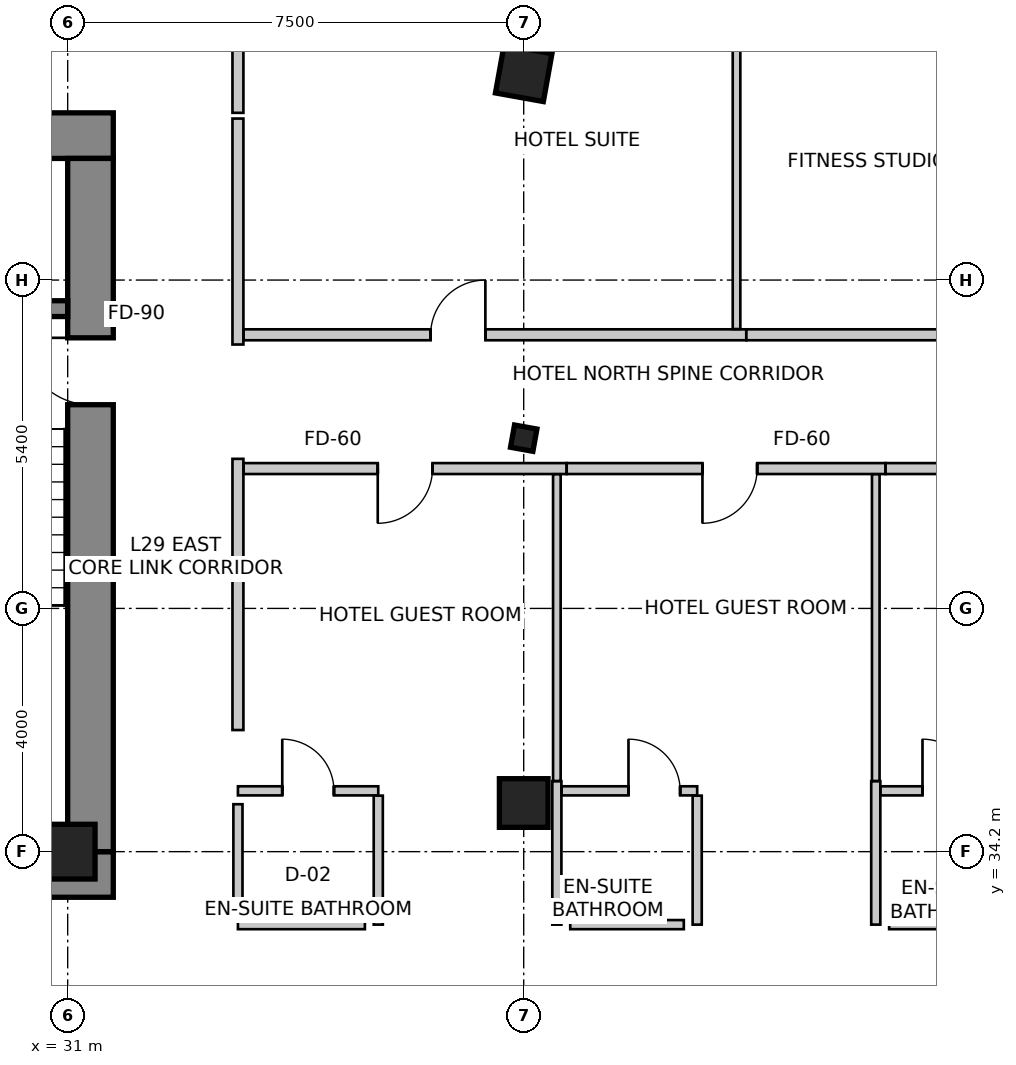
"""IFC4 building model, lengths in metres.
Left out: names, types, materials, properties, quantities, classifications, styles, units other than length and angle.
Written with IfcOpenShell. Run it as: python <this file> out.ifc"""

import sys

from ifc_helpers import new_model, si_unit, direction, frame, frame_2d, origin, origin_2d, place, context, subcontext, project, spatial, rectangle, i_section, extrude, source, transform, mapped, element, fill, save


model = new_model("IFC4")
c1 = context("Model", 3, precision=1e-05, world=origin(), true_north=direction((0.0, 1.0)))
c2 = subcontext(c1, "Body", "Model", "MODEL_VIEW")
j1 = project(units=[si_unit("LENGTHUNIT", "METRE"), si_unit("PLANEANGLEUNIT", "RADIAN")], contexts=[c1])
p1 = place(None, origin())
s1 = spatial("IfcSite", under=j1, at=p1, CompositionType="ELEMENT")
p2 = place(p1, origin())
s2 = spatial("IfcBuilding", under=s1, at=p2, CompositionType="ELEMENT")
p3 = place(p2, frame((0.0, 0.0, 121.4)))
s3 = spatial("IfcBuildingStorey", under=s2, at=p3, CompositionType="ELEMENT", Elevation=121.4)
p4 = place(p3, frame((15.85, 45.975, 0.0), z_axis=(0.0, 0.0, 1.0), x_axis=(1.0, 0.0, 0.0)))
e1 = element("IfcWall", 1, at=p4, inside=s3, PredefinedType="SHEAR", context=c2, shape_type="SweptSolid", body=[
    extrude(rectangle(XDim=15.9, YDim=0.75, at=frame_2d((7.95, 0.0))), origin(), (0.0, 0.0, 1.0), 3.6),
])
p5 = place(p3, frame((15.85, 33.825, 0.0), z_axis=(0.0, 0.0, 1.0), x_axis=(1.0, 0.0, 0.0)))
e2 = element("IfcWall", 2, at=p5, inside=s3, PredefinedType="SHEAR", context=c2, shape_type="SweptSolid", body=[
    extrude(rectangle(XDim=15.9, YDim=0.75, at=frame_2d((7.95, 0.0))), origin(), (0.0, 0.0, 1.0), 3.6),
])
m1 = source(origin(), c2, "Body", "SweptSolid", [
    extrude(rectangle(XDim=1.3, YDim=2.15, at=frame_2d((0.65, 1.075))), frame((0.0, 0.385, 0.0), z_axis=(0.0, -1.0, 0.0), x_axis=(1.0, 0.0, 0.0)), (0.0, 0.0, 1.0), 0.77),
])
p6 = place(p5, frame((10.08, 0.0, 0.0)))
e3 = element("IfcOpeningElement", 3, at=p6, cuts=e2, PredefinedType="OPENING", context=c2, shape_type="MappedRepresentation", body=[
    mapped(m1, transform((0.0, 0.0, 0.0), scale=1.0)),
])
p7 = place(p3, frame((31.375, 34.2, 0.0), z_axis=(0.0, 0.0, 1.0), x_axis=(0.0, 1.0, 0.0)))
e4 = element("IfcWall", 4, at=p7, inside=s3, PredefinedType="SHEAR", context=c2, shape_type="SweptSolid", body=[
    extrude(rectangle(XDim=11.4, YDim=0.75, at=frame_2d((5.7, 0.0))), origin(), (0.0, 0.0, 1.0), 3.6),
])
m2 = source(origin(), c2, "Body", "SweptSolid", [
    extrude(rectangle(XDim=1.1, YDim=2.15, at=frame_2d((0.55, 1.075))), frame((0.0, 0.385, 0.0), z_axis=(0.0, -1.0, 0.0), x_axis=(1.0, 0.0, 0.0)), (0.0, 0.0, 1.0), 0.77),
])
p8 = place(p7, frame((7.35, 0.0, 0.0)))
e5 = element("IfcOpeningElement", 5, at=p8, cuts=e4, PredefinedType="OPENING", context=c2, shape_type="MappedRepresentation", body=[
    mapped(m2, transform((0.0, 0.0, 0.0), scale=1.0)),
])
p9 = place(p3, frame((27.5, 43.13, 0.0), z_axis=(0.0, 0.0, 1.0), x_axis=(1.0, 0.0, 0.0)))
e6 = element("IfcWall", 6, at=p9, inside=s3, PredefinedType="SHEAR", context=c2, shape_type="SweptSolid", body=[
    extrude(rectangle(XDim=3.5, YDim=0.26, at=frame_2d((1.75, 0.0))), origin(), (0.0, 0.0, 1.0), 3.6),
])
m3 = source(origin(), c2, "Body", "SweptSolid", [
    extrude(rectangle(XDim=0.8, YDim=0.8, at=origin_2d()), origin(), (0.0, 0.0, 1.0), 3.6),
])
p10 = place(p3, frame((38.5, 47.0, 0.0), z_axis=(0.0, 0.0, 1.0), x_axis=(0.984195607969, -0.17708474032, 0.0)))
e7 = element("IfcColumn", 7, at=p10, inside=s3, PredefinedType="COLUMN", context=c2, shape_type="MappedRepresentation", body=[
    mapped(m3, transform((0.0, 0.0, 0.0), scale=1.0)),
])
m4 = source(origin(), c2, "Body", "SweptSolid", [
    extrude(rectangle(XDim=0.9, YDim=0.9, at=origin_2d()), origin(), (0.0, 0.0, 1.0), 3.6),
])
p11 = place(p3, frame((31.0, 34.2, 0.0), z_axis=(0.0, 0.0, 1.0), x_axis=(1.0, 0.0, 0.0)))
e8 = element("IfcColumn", 8, at=p11, inside=s3, PredefinedType="COLUMN", context=c2, shape_type="MappedRepresentation", body=[
    mapped(m4, transform((0.0, 0.0, 0.0), scale=1.0)),
])
p12 = place(p3, frame((38.5, 35.0, 0.0), z_axis=(0.0, 0.0, 1.0), x_axis=(1.0, 0.0, 0.0)))
e9 = element("IfcColumn", 9, at=p12, inside=s3, PredefinedType="COLUMN", context=c2, shape_type="MappedRepresentation", body=[
    mapped(m3, transform((0.0, 0.0, 0.0), scale=1.0)),
])
m5 = source(origin(), c2, "Body", "SweptSolid", [
    extrude(i_section(OverallWidth=0.374, OverallDepth=0.372, WebThickness=0.016, FlangeThickness=0.026, FilletRadius=0.015, at=origin_2d()), origin(), (0.0, 0.0, 1.0), 3.6),
])
p13 = place(p3, frame((38.5, 41.0, 0.0), z_axis=(0.0, 0.0, 1.0), x_axis=(0.984195607969, -0.17708474032, 0.0)))
e10 = element("IfcColumn", 10, at=p13, inside=s3, PredefinedType="COLUMN", context=c2, shape_type="MappedRepresentation", body=[
    mapped(m5, transform((0.0, 0.0, 0.0), scale=1.0)),
])
p14 = place(p3, frame((53.561, 47.48, 0.0), z_axis=(0.0, 0.0, 1.0), x_axis=(-0.985845173895, 0.167658262868, 0.0)))
e11 = element("IfcWall", 11, at=p14, inside=s3, PredefinedType="SOLIDWALL", context=c2, shape_type="SweptSolid", body=[
    extrude(rectangle(XDim=32.132, YDim=0.3, at=frame_2d((16.066, 0.0))), origin(), (0.0, 0.0, 1.0), 3.35),
])
m6 = source(origin(), c2, "Body", "SweptSolid", [
    extrude(rectangle(XDim=2.1, YDim=2.0, at=frame_2d((1.05, 1.0))), frame((0.0, 0.16, 0.0), z_axis=(0.0, -1.0, 0.0), x_axis=(1.0, 0.0, 0.0)), (0.0, 0.0, 1.0), 0.32),
])
p15 = place(p14, frame((1.032, 0.0, 0.85)))
e12 = element("IfcOpeningElement", 12, at=p15, cuts=e11, PredefinedType="OPENING", context=c2, shape_type="MappedRepresentation", body=[
    mapped(m6, transform((0.0, 0.0, 0.0), scale=1.0)),
])
p16 = place(p14, frame((6.836, 0.0, 0.85)))
e13 = element("IfcOpeningElement", 13, at=p16, cuts=e11, PredefinedType="OPENING", context=c2, shape_type="MappedRepresentation", body=[
    mapped(m6, transform((0.0, 0.0, 0.0), scale=1.0)),
])
p17 = place(p14, frame((13.599, 0.0, 0.85)))
e14 = element("IfcOpeningElement", 14, at=p17, cuts=e11, PredefinedType="OPENING", context=c2, shape_type="MappedRepresentation", body=[
    mapped(m6, transform((0.0, 0.0, 0.0), scale=1.0)),
])
m7 = source(origin(), c2, "Body", "SweptSolid", [
    extrude(rectangle(XDim=1.5, YDim=1.8, at=frame_2d((0.75, 0.9))), frame((0.0, 0.16, 0.0), z_axis=(0.0, -1.0, 0.0), x_axis=(1.0, 0.0, 0.0)), (0.0, 0.0, 1.0), 0.32),
])
p18 = place(p14, frame((18.039, 0.0, 0.85)))
e15 = element("IfcOpeningElement", 15, at=p18, cuts=e11, PredefinedType="OPENING", context=c2, shape_type="MappedRepresentation", body=[
    mapped(m7, transform((0.0, 0.0, 0.0), scale=1.0)),
])
p19 = place(p14, frame((20.459, 0.0, 0.85)))
e16 = element("IfcOpeningElement", 16, at=p19, cuts=e11, PredefinedType="OPENING", context=c2, shape_type="MappedRepresentation", body=[
    mapped(m6, transform((0.0, 0.0, 0.0), scale=1.0)),
])
p20 = place(p14, frame((25.55, 0.0, 0.85)))
e17 = element("IfcOpeningElement", 17, at=p20, cuts=e11, PredefinedType="OPENING", context=c2, shape_type="MappedRepresentation", body=[
    mapped(m6, transform((0.0, 0.0, 0.0), scale=1.0)),
])
m8 = source(origin(), c2, "Body", "SweptSolid", [
    extrude(rectangle(XDim=0.9, YDim=1.6, at=frame_2d((0.45, 0.8))), frame((0.0, 0.16, 0.0), z_axis=(0.0, -1.0, 0.0), x_axis=(1.0, 0.0, 0.0)), (0.0, 0.0, 1.0), 0.32),
])
p21 = place(p14, frame((30.65, 0.0, 0.85)))
e18 = element("IfcOpeningElement", 18, at=p21, cuts=e11, PredefinedType="OPENING", context=c2, shape_type="MappedRepresentation", body=[
    mapped(m8, transform((0.0, 0.0, 0.0), scale=1.0)),
])
p22 = place(p3, frame((33.8, 48.5, 0.0), z_axis=(0.0, 0.0, 1.0), x_axis=(0.0, -1.0, 0.0)))
e19 = element("IfcWall", 19, at=p22, inside=s3, PredefinedType="PARTITIONING", context=c2, shape_type="SweptSolid", body=[
    extrude(rectangle(XDim=2.15, YDim=0.18, at=frame_2d((1.075, 0.0))), origin(), (0.0, 0.0, 1.0), 2.492),
])
p23 = place(p3, frame((33.8, 40.66, 0.0), z_axis=(0.0, 0.0, 1.0), x_axis=(0.0, -1.0, 0.0)))
e20 = element("IfcWall", 20, at=p23, inside=s3, PredefinedType="PARTITIONING", context=c2, shape_type="SweptSolid", body=[
    extrude(rectangle(XDim=4.46, YDim=0.18, at=frame_2d((2.23, 0.0))), origin(), (0.0, 0.0, 1.0), 3.35),
])
p24 = place(p3, frame((33.8, 46.256, 0.0), z_axis=(0.0, 0.0, 1.0), x_axis=(0.0, -1.0, 0.0)))
e21 = element("IfcWall", 21, at=p24, inside=s3, PredefinedType="PARTITIONING", context=c2, shape_type="SweptSolid", body=[
    extrude(rectangle(XDim=3.716, YDim=0.18, at=frame_2d((1.858, 0.0))), origin(), (0.0, 0.0, 1.0), 2.922),
])
p25 = place(p3, frame((39.205, 40.5, 0.0), z_axis=(0.0, 0.0, 1.0), x_axis=(-1.0, 0.0, 0.0)))
e22 = element("IfcWall", 22, at=p25, inside=s3, PredefinedType="PARTITIONING", context=c2, shape_type="SweptSolid", body=[
    extrude(rectangle(XDim=5.311, YDim=0.18, at=frame_2d((2.656, 0.0))), origin(), (0.0, 0.0, 1.0), 2.803),
])
m9 = source(origin(), c2, "Body", "SweptSolid", [
    extrude(rectangle(XDim=0.9, YDim=2.15, at=frame_2d((0.45, 1.075))), frame((0.0, 0.1, 0.0), z_axis=(0.0, -1.0, 0.0), x_axis=(1.0, 0.0, 0.0)), (0.0, 0.0, 1.0), 0.2),
])
p26 = place(p25, frame((2.206, 0.0, 0.0)))
e23 = element("IfcOpeningElement", 23, at=p26, cuts=e22, PredefinedType="OPENING", context=c2, shape_type="MappedRepresentation", body=[
    mapped(m9, transform((0.0, 0.0, 0.0), scale=1.0)),
])
p27 = place(p3, frame((44.45, 40.5, 0.0), z_axis=(0.0, 0.0, 1.0), x_axis=(-1.0, 0.0, 0.0)))
e24 = element("IfcWall", 24, at=p27, inside=s3, PredefinedType="PARTITIONING", context=c2, shape_type="SweptSolid", body=[
    extrude(rectangle(XDim=5.243, YDim=0.18, at=frame_2d((2.622, 0.0))), origin(), (0.0, 0.0, 1.0), 2.922),
])
p28 = place(p27, frame((2.111, 0.0, 0.0)))
e25 = element("IfcOpeningElement", 25, at=p28, cuts=e24, PredefinedType="OPENING", context=c2, shape_type="MappedRepresentation", body=[
    mapped(m9, transform((0.0, 0.0, 0.0), scale=1.0)),
])
p29 = place(p3, frame((49.535, 40.5, 0.0), z_axis=(0.0, 0.0, 1.0), x_axis=(-1.0, 0.0, 0.0)))
e26 = element("IfcWall", 26, at=p29, inside=s3, PredefinedType="PARTITIONING", context=c2, shape_type="SweptSolid", body=[
    extrude(rectangle(XDim=5.083, YDim=0.18, at=frame_2d((2.542, 0.0))), origin(), (0.0, 0.0, 1.0), 2.803),
])
p30 = place(p29, frame((2.092, 0.0, 0.0)))
e27 = element("IfcOpeningElement", 27, at=p30, cuts=e26, PredefinedType="OPENING", context=c2, shape_type="MappedRepresentation", body=[
    mapped(m9, transform((0.0, 0.0, 0.0), scale=1.0)),
])
p31 = place(p3, frame((33.894, 42.7, 0.0), z_axis=(0.0, 0.0, 1.0), x_axis=(1.0, 0.0, 0.0)))
e28 = element("IfcWall", 28, at=p31, inside=s3, PredefinedType="PARTITIONING", context=c2, shape_type="SweptSolid", body=[
    extrude(rectangle(XDim=8.266, YDim=0.18, at=frame_2d((4.133, 0.0))), origin(), (0.0, 0.0, 1.0), 2.803),
])
p32 = place(p31, frame((3.075, 0.0, 0.0)))
e29 = element("IfcOpeningElement", 29, at=p32, cuts=e28, PredefinedType="OPENING", context=c2, shape_type="MappedRepresentation", body=[
    mapped(m9, transform((0.0, 0.0, 0.0), scale=1.0)),
])
p33 = place(p3, frame((42.162, 42.7, 0.0), z_axis=(0.0, 0.0, 1.0), x_axis=(1.0, 0.0, 0.0)))
e30 = element("IfcWall", 30, at=p33, inside=s3, PredefinedType="PARTITIONING", context=c2, shape_type="SweptSolid", body=[
    extrude(rectangle(XDim=7.373, YDim=0.18, at=frame_2d((3.687, 0.0))), origin(), (0.0, 0.0, 1.0), 2.803),
])
p34 = place(p33, frame((3.176, 0.0, 0.0)))
e31 = element("IfcOpeningElement", 31, at=p34, cuts=e30, PredefinedType="OPENING", context=c2, shape_type="MappedRepresentation", body=[
    mapped(m9, transform((0.0, 0.0, 0.0), scale=1.0)),
])
p35 = place(p3, frame((33.8, 35.2, 0.0), z_axis=(0.0, 0.0, 1.0), x_axis=(1.0, 0.0, 0.0)))
e32 = element("IfcWall", 32, at=p35, inside=s3, PredefinedType="PARTITIONING", context=c2, shape_type="SweptSolid", body=[
    extrude(rectangle(XDim=2.308, YDim=0.15, at=frame_2d((1.154, 0.0))), origin(), (0.0, 0.0, 1.0), 3.35),
])
m10 = source(origin(), c2, "Body", "SweptSolid", [
    extrude(rectangle(XDim=0.85, YDim=2.15, at=frame_2d((0.425, 1.075))), frame((0.0, 0.085, 0.0), z_axis=(0.0, -1.0, 0.0), x_axis=(1.0, 0.0, 0.0)), (0.0, 0.0, 1.0), 0.17),
])
p36 = place(p35, frame((0.729, 0.0, 0.0)))
e33 = element("IfcOpeningElement", 33, at=p36, cuts=e32, PredefinedType="OPENING", context=c2, shape_type="MappedRepresentation", body=[
    mapped(m10, transform((0.0, 0.0, 0.0), scale=1.0)),
])
p37 = place(p3, frame((36.108, 35.121, 0.0), z_axis=(0.0, 0.0, 1.0), x_axis=(0.0, -1.0, 0.0)))
e34 = element("IfcWall", 34, at=p37, inside=s3, PredefinedType="PARTITIONING", context=c2, shape_type="SweptSolid", body=[
    extrude(rectangle(XDim=2.121, YDim=0.15, at=frame_2d((1.061, 0.0))), origin(), (0.0, 0.0, 1.0), 3.35),
])
p38 = place(p3, frame((39.045, 35.36, 0.0), z_axis=(0.0, 0.0, 1.0), x_axis=(0.0, -1.0, 0.0)))
e35 = element("IfcWall", 35, at=p38, inside=s3, PredefinedType="PARTITIONING", context=c2, shape_type="SweptSolid", body=[
    extrude(rectangle(XDim=2.36, YDim=0.15, at=frame_2d((1.18, 0.0))), origin(), (0.0, 0.0, 1.0), 2.492),
])
p39 = place(p3, frame((39.045, 40.406, 0.0), z_axis=(0.0, 0.0, 1.0), x_axis=(0.0, -1.0, 0.0)))
e36 = element("IfcWall", 36, at=p39, inside=s3, PredefinedType="PARTITIONING", context=c2, shape_type="SweptSolid", body=[
    extrude(rectangle(XDim=5.044, YDim=0.125, at=frame_2d((2.522, 0.0))), origin(), (0.0, 0.0, 1.0), 2.922),
])
p40 = place(p3, frame((39.124, 35.2, 0.0), z_axis=(0.0, 0.0, 1.0), x_axis=(1.0, 0.0, 0.0)))
e37 = element("IfcWall", 37, at=p40, inside=s3, PredefinedType="PARTITIONING", context=c2, shape_type="SweptSolid", body=[
    extrude(rectangle(XDim=2.229, YDim=0.15, at=frame_2d((1.115, 0.0))), origin(), (0.0, 0.0, 1.0), 2.492),
])
p41 = place(p40, frame((1.099, 0.0, 0.0)))
e38 = element("IfcOpeningElement", 38, at=p41, cuts=e37, PredefinedType="OPENING", context=c2, shape_type="MappedRepresentation", body=[
    mapped(m10, transform((0.0, 0.0, 0.0), scale=1.0)),
])
p42 = place(p3, frame((41.353, 35.121, 0.0), z_axis=(0.0, 0.0, 1.0), x_axis=(0.0, -1.0, 0.0)))
e39 = element("IfcWall", 39, at=p42, inside=s3, PredefinedType="PARTITIONING", context=c2, shape_type="SweptSolid", body=[
    extrude(rectangle(XDim=2.121, YDim=0.15, at=frame_2d((1.061, 0.0))), origin(), (0.0, 0.0, 1.0), 2.492),
])
p43 = place(p3, frame((44.29, 35.36, 0.0), z_axis=(0.0, 0.0, 1.0), x_axis=(0.0, -1.0, 0.0)))
e40 = element("IfcWall", 40, at=p43, inside=s3, PredefinedType="PARTITIONING", context=c2, shape_type="SweptSolid", body=[
    extrude(rectangle(XDim=2.36, YDim=0.15, at=frame_2d((1.18, 0.0))), origin(), (0.0, 0.0, 1.0), 2.492),
])
p44 = place(p3, frame((44.29, 40.406, 0.0), z_axis=(0.0, 0.0, 1.0), x_axis=(0.0, -1.0, 0.0)))
e41 = element("IfcWall", 41, at=p44, inside=s3, PredefinedType="PARTITIONING", context=c2, shape_type="SweptSolid", body=[
    extrude(rectangle(XDim=5.044, YDim=0.125, at=frame_2d((2.522, 0.0))), origin(), (0.0, 0.0, 1.0), 2.922),
])
p45 = place(p3, frame((44.369, 35.2, 0.0), z_axis=(0.0, 0.0, 1.0), x_axis=(1.0, 0.0, 0.0)))
e42 = element("IfcWall", 42, at=p45, inside=s3, PredefinedType="PARTITIONING", context=c2, shape_type="SweptSolid", body=[
    extrude(rectangle(XDim=2.229, YDim=0.15, at=frame_2d((1.115, 0.0))), origin(), (0.0, 0.0, 1.0), 2.492),
])
p46 = place(p45, frame((0.689, 0.0, 0.0)))
e43 = element("IfcOpeningElement", 43, at=p46, cuts=e42, PredefinedType="OPENING", context=c2, shape_type="MappedRepresentation", body=[
    mapped(m10, transform((0.0, 0.0, 0.0), scale=1.0)),
])
p47 = place(p3, frame((42.0, 49.33, 0.0), z_axis=(0.0, 0.0, 1.0), x_axis=(0.0, -1.0, 0.0)))
e44 = element("IfcWall", 44, at=p47, inside=s3, PredefinedType="PARTITIONING", context=c2, shape_type="SweptSolid", body=[
    extrude(rectangle(XDim=6.536, YDim=0.125, at=frame_2d((3.268, 0.0))), origin(), (0.0, 0.0, 1.0), 2.492),
])
p48 = place(p3, frame((35.888, 33.0, 0.0), z_axis=(0.0, 0.0, 1.0), x_axis=(-1.0, 0.0, 0.0)))
e45 = element("IfcWall", 45, at=p48, inside=s3, PredefinedType="PARTITIONING", context=c2, shape_type="SweptSolid", body=[
    extrude(rectangle(XDim=2.088, YDim=0.15, at=frame_2d((1.044, 0.0))), origin(), (0.0, 0.0, 1.0), 3.35),
])
p49 = place(p3, frame((33.8, 33.22, 0.0), z_axis=(0.0, 0.0, 1.0), x_axis=(0.0, 1.0, 0.0)))
e46 = element("IfcWall", 46, at=p49, inside=s3, PredefinedType="PARTITIONING", context=c2, shape_type="SweptSolid", body=[
    extrude(rectangle(XDim=1.76, YDim=0.15, at=frame_2d((0.88, 0.0))), origin(), (0.0, 0.0, 1.0), 3.35),
])
p50 = place(p3, frame((41.133, 33.0, 0.0), z_axis=(0.0, 0.0, 1.0), x_axis=(-1.0, 0.0, 0.0)))
e47 = element("IfcWall", 47, at=p50, inside=s3, PredefinedType="PARTITIONING", context=c2, shape_type="SweptSolid", body=[
    extrude(rectangle(XDim=1.868, YDim=0.15, at=frame_2d((0.934, 0.0))), origin(), (0.0, 0.0, 1.0), 3.35),
])
p51 = place(p3, frame((46.378, 33.0, 0.0), z_axis=(0.0, 0.0, 1.0), x_axis=(-1.0, 0.0, 0.0)))
e48 = element("IfcWall", 48, at=p51, inside=s3, PredefinedType="PARTITIONING", context=c2, shape_type="SweptSolid", body=[
    extrude(rectangle(XDim=1.868, YDim=0.15, at=frame_2d((0.934, 0.0))), origin(), (0.0, 0.0, 1.0), 3.35),
])
m11 = source(origin(), c2, "Body", "SweptSolid", [
    extrude(rectangle(XDim=1.1, YDim=2.15, at=frame_2d((0.55, 1.075))), frame((0.0, 0.025, 0.0), z_axis=(0.0, -1.0, 0.0), x_axis=(1.0, 0.0, 0.0)), (0.0, 0.0, 1.0), 0.05),
])
p52 = place(p8, origin())
e49 = element("IfcDoor", 49, at=p52, inside=s3, OperationType="SINGLE_SWING_RIGHT", PredefinedType="DOOR", context=c2, shape_type="MappedRepresentation", body=[
    mapped(m11, transform((0.0, 0.0, 0.0), scale=1.0)),
])
fill(e5, e49)
m12 = source(origin(), c2, "Body", "SweptSolid", [
    extrude(rectangle(XDim=0.85, YDim=2.15, at=frame_2d((0.425, 1.075))), frame((0.0, 0.025, 0.0), z_axis=(0.0, -1.0, 0.0), x_axis=(1.0, 0.0, 0.0)), (0.0, 0.0, 1.0), 0.05),
])
p53 = place(p36, origin())
e50 = element("IfcDoor", 50, at=p53, inside=s3, OperationType="SINGLE_SWING_LEFT", PredefinedType="DOOR", context=c2, shape_type="MappedRepresentation", body=[
    mapped(m12, transform((0.0, 0.0, 0.0), scale=1.0)),
])
fill(e33, e50)
m13 = source(origin(), c2, "Body", "SweptSolid", [
    extrude(rectangle(XDim=0.9, YDim=2.15, at=frame_2d((0.45, 1.075))), frame((0.0, 0.025, 0.0), z_axis=(0.0, -1.0, 0.0), x_axis=(1.0, 0.0, 0.0)), (0.0, 0.0, 1.0), 0.05),
])
p54 = place(p26, origin())
e51 = element("IfcDoor", 51, at=p54, inside=s3, OperationType="SINGLE_SWING_RIGHT", PredefinedType="DOOR", context=c2, shape_type="MappedRepresentation", body=[
    mapped(m13, transform((0.0, 0.0, 0.0), scale=1.0)),
])
fill(e23, e51)
p55 = place(p41, origin())
e52 = element("IfcDoor", 52, at=p55, inside=s3, OperationType="SINGLE_SWING_LEFT", PredefinedType="DOOR", context=c2, shape_type="MappedRepresentation", body=[
    mapped(m12, transform((0.0, 0.0, 0.0), scale=1.0)),
])
fill(e38, e52)
p56 = place(p28, origin())
e53 = element("IfcDoor", 53, at=p56, inside=s3, OperationType="SINGLE_SWING_RIGHT", PredefinedType="DOOR", context=c2, shape_type="MappedRepresentation", body=[
    mapped(m13, transform((0.0, 0.0, 0.0), scale=1.0)),
])
fill(e25, e53)
p57 = place(p46, origin())
e54 = element("IfcDoor", 54, at=p57, inside=s3, OperationType="SINGLE_SWING_LEFT", PredefinedType="DOOR", context=c2, shape_type="MappedRepresentation", body=[
    mapped(m12, transform((0.0, 0.0, 0.0), scale=1.0)),
])
fill(e43, e54)
p58 = place(p32, origin())
e55 = element("IfcDoor", 55, at=p58, inside=s3, OperationType="SINGLE_SWING_RIGHT", PredefinedType="DOOR", context=c2, shape_type="MappedRepresentation", body=[
    mapped(m13, transform((0.0, 0.0, 0.0), scale=1.0)),
])
fill(e29, e55)
save(model, sys.argv[1])
